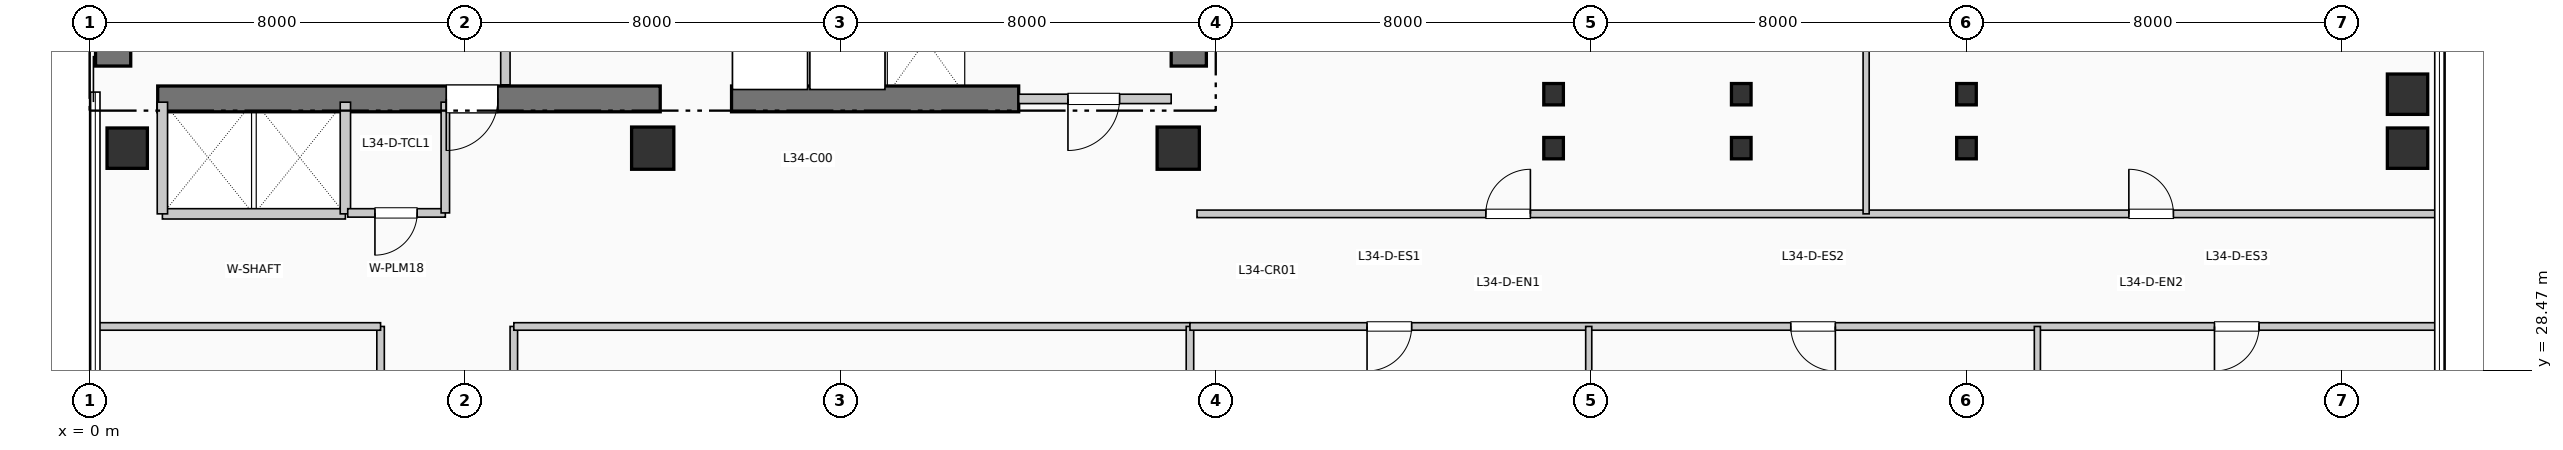
"""IFC4 building model, lengths in metres.
Left out: names, types, materials, properties, quantities, classifications, styles, units other than length and angle.
Written with IfcOpenShell. Run it as: python <this file> out.ifc"""

import sys

from ifc_helpers import new_model, si_unit, direction, frame, frame_2d, origin, origin_2d, place, context, subcontext, project, spatial, rectangle, i_section, extrude, element, fill, save


model = new_model("IFC4")
c1 = context("Model", 3, precision=1e-05, world=origin(), true_north=direction((0.0, 1.0)))
c2 = subcontext(c1, "Body", "Model", "MODEL_VIEW")
j1 = project(units=[si_unit("LENGTHUNIT", "METRE"), si_unit("PLANEANGLEUNIT", "RADIAN")], contexts=[c1])
p1 = place(None, origin())
s1 = spatial("IfcSite", under=j1, at=p1, CompositionType="ELEMENT")
p2 = place(p1, origin())
s2 = spatial("IfcBuilding", under=s1, at=p2, CompositionType="ELEMENT")
p3 = place(p2, frame((0.0, 0.0, 142.89)))
s3 = spatial("IfcBuildingStorey", under=s2, at=p3, CompositionType="ELEMENT", Elevation=142.89)
p4 = place(p3, frame((0.5, 34.95, 0.0), z_axis=(0.0, 0.0, 1.0), x_axis=(0.0, 1.0, 0.0)))
e1 = element("IfcWall", 1, at=p4, inside=s3, PredefinedType="SHEAR", context=c2, shape_type="SweptSolid", body=[
    extrude(rectangle(XDim=7.9, YDim=0.75, at=frame_2d((3.95, 0.0))), origin(), (0.0, 0.0, 1.0), 3.96),
])
p5 = place(p3, frame((23.425, 34.95, 0.0), z_axis=(0.0, 0.0, 1.0), x_axis=(0.0, 1.0, 0.0)))
e2 = element("IfcWall", 2, at=p5, inside=s3, PredefinedType="SHEAR", context=c2, shape_type="SweptSolid", body=[
    extrude(rectangle(XDim=10.64, YDim=0.75, at=frame_2d((5.32, 0.0))), origin(), (0.0, 0.0, 1.0), 3.96),
])
p6 = place(p3, frame((1.45, 34.25, 0.0), z_axis=(0.0, 0.0, 1.0), x_axis=(1.0, 0.0, 0.0)))
e3 = element("IfcWall", 3, at=p6, inside=s3, PredefinedType="SHEAR", context=c2, shape_type="SweptSolid", body=[
    extrude(rectangle(XDim=10.71, YDim=0.55, at=frame_2d((5.355, 0.0))), origin(), (0.0, 0.0, 1.0), 3.96),
])
p7 = place(p6, frame((7.25, 0.0, 0.0), z_axis=(0.0, 0.0, 1.0), x_axis=(-1.0, 0.0, 0.0)))
e4 = element("IfcOpeningElement", 4, at=p7, cuts=e3, PredefinedType="OPENING", context=c2, shape_type="SweptSolid", body=[
    extrude(rectangle(XDim=1.1, YDim=2.15, at=frame_2d((0.55, 1.075))), frame((0.0, 0.285, 0.0), z_axis=(0.0, -1.0, 0.0), x_axis=(1.0, 0.0, 0.0)), (0.0, 0.0, 1.0), 0.57),
])
p8 = place(p3, frame((13.68, 34.25, 0.0), z_axis=(0.0, 0.0, 1.0), x_axis=(1.0, 0.0, 0.0)))
e5 = element("IfcWall", 5, at=p8, inside=s3, PredefinedType="SHEAR", context=c2, shape_type="SweptSolid", body=[
    extrude(rectangle(XDim=6.12, YDim=0.55, at=frame_2d((3.06, 0.0))), origin(), (0.0, 0.0, 1.0), 3.96),
])
p9 = place(p3, frame((0.8, 33.2, 0.0), z_axis=(0.0, 0.0, 1.0), x_axis=(1.0, 0.0, 0.0)))
e6 = element("IfcColumn", 6, at=p9, inside=s3, PredefinedType="COLUMN", context=c2, shape_type="SweptSolid", body=[
    extrude(rectangle(XDim=0.86, YDim=0.86, at=origin_2d()), origin(), (0.0, 0.0, 1.0), 3.96),
])
for number, where, z_axis, x_axis in (
    (7, (12.0, 33.2, 0.0), (0.0, 0.0, 1.0), (1.0, 0.0, 0.0)),
    (8, (23.2, 33.2, 0.0), (0.0, 0.0, 1.0), (1.0, 0.0, 0.0)),
):
    element("IfcColumn", number, at=place(p3, frame(where, z_axis=z_axis, x_axis=x_axis)), inside=s3, PredefinedType="COLUMN", context=c2, shape_type="SweptSolid", body=[
        extrude(rectangle(XDim=0.9, YDim=0.9, at=origin_2d()), origin(), (0.0, 0.0, 1.0), 3.96),
    ])
for number, where, z_axis, x_axis in (
    (9, (31.2, 33.2, 0.0), (0.0, 0.0, 1.0), (1.0, 0.0, 0.0)),
    (10, (31.2, 34.35, 0.0), (0.0, 0.0, 1.0), (1.0, 0.0, 0.0)),
    (11, (35.2, 33.2, 0.0), (0.0, 0.0, 1.0), (1.0, 0.0, 0.0)),
    (12, (35.2, 34.35, 0.0), (0.0, 0.0, 1.0), (1.0, 0.0, 0.0)),
    (13, (40.0, 33.2, 0.0), (0.0, 0.0, 1.0), (1.0, 0.0, 0.0)),
    (14, (40.0, 34.35, 0.0), (0.0, 0.0, 1.0), (1.0, 0.0, 0.0)),
):
    element("IfcColumn", number, at=place(p3, frame(where, z_axis=z_axis, x_axis=x_axis)), inside=s3, PredefinedType="COLUMN", context=c2, shape_type="SweptSolid", body=[
        extrude(i_section(OverallWidth=0.418, OverallDepth=0.455, WebThickness=0.032, FlangeThickness=0.051, at=origin_2d()), origin(), (0.0, 0.0, 1.0), 3.96),
    ])
for number, where, z_axis, x_axis in (
    (15, (49.4, 33.2, 0.0), (0.0, 0.0, 1.0), (1.0, 0.0, 0.0)),
    (16, (49.4, 34.35, 0.0), (0.0, 0.0, 1.0), (1.0, 0.0, 0.0)),
):
    element("IfcColumn", number, at=place(p3, frame(where, z_axis=z_axis, x_axis=x_axis)), inside=s3, PredefinedType="COLUMN", context=c2, shape_type="SweptSolid", body=[
        extrude(rectangle(XDim=0.86, YDim=0.86, at=origin_2d()), origin(), (0.0, 0.0, 1.0), 3.96),
    ])
p10 = place(p3, frame((8.86, 34.55, 0.0), z_axis=(0.0, 0.0, 1.0), x_axis=(0.0, 1.0, 0.0)))
e17 = element("IfcWall", 17, at=p10, inside=s3, PredefinedType="PARTITIONING", context=c2, shape_type="SweptSolid", body=[
    extrude(rectangle(XDim=2.5, YDim=0.2, at=frame_2d((1.25, 0.0))), origin(), (0.0, 0.0, 1.0), 3.71),
])
p11 = place(p3, frame((19.8, 34.25, 0.0), z_axis=(0.0, 0.0, 1.0), x_axis=(1.0, 0.0, 0.0)))
e18 = element("IfcWall", 18, at=p11, inside=s3, PredefinedType="PARTITIONING", context=c2, shape_type="SweptSolid", body=[
    extrude(rectangle(XDim=3.25, YDim=0.2, at=frame_2d((1.625, 0.0))), origin(), (0.0, 0.0, 1.0), 3.71),
])
p12 = place(p11, frame((2.15, 0.0, 0.0), z_axis=(0.0, 0.0, 1.0), x_axis=(-1.0, 0.0, 0.0)))
e19 = element("IfcOpeningElement", 19, at=p12, cuts=e18, PredefinedType="OPENING", context=c2, shape_type="SweptSolid", body=[
    extrude(rectangle(XDim=1.1, YDim=2.15, at=frame_2d((0.55, 1.075))), frame((0.0, 0.11, 0.0), z_axis=(0.0, -1.0, 0.0), x_axis=(1.0, 0.0, 0.0)), (0.0, 0.0, 1.0), 0.22),
])
p13 = place(p3, frame((1.55, 31.8, 0.0), z_axis=(0.0, 0.0, 1.0), x_axis=(1.0, 0.0, 0.0)))
e20 = element("IfcWall", 20, at=p13, inside=s3, PredefinedType="PARTITIONING", context=c2, shape_type="SweptSolid", body=[
    extrude(rectangle(XDim=3.9, YDim=0.22, at=frame_2d((1.95, 0.0))), origin(), (0.0, 0.0, 1.0), 3.71),
])
for number, where, z_axis, x_axis in (
    (21, (1.55, 31.8, 0.0), (0.0, 0.0, 1.0), (0.0, 1.0, 0.0)),
    (22, (5.45, 31.8, 0.0), (0.0, 0.0, 1.0), (0.0, 1.0, 0.0)),
):
    element("IfcWall", number, at=place(p3, frame(where, z_axis=z_axis, x_axis=x_axis)), inside=s3, PredefinedType="PARTITIONING", context=c2, shape_type="SweptSolid", body=[
        extrude(rectangle(XDim=2.38, YDim=0.22, at=frame_2d((1.19, 0.0))), origin(), (0.0, 0.0, 1.0), 3.71),
    ])
p14 = place(p3, frame((5.5, 31.82, 0.0), z_axis=(0.0, 0.0, 1.0), x_axis=(1.0, 0.0, 0.0)))
e23 = element("IfcWall", 23, at=p14, inside=s3, PredefinedType="PLUMBINGWALL", context=c2, shape_type="SweptSolid", body=[
    extrude(rectangle(XDim=2.08, YDim=0.18, at=frame_2d((1.04, 0.0))), origin(), (0.0, 0.0, 1.0), 3.71),
])
p15 = place(p14, frame((1.48, 0.0, 0.0), z_axis=(0.0, 0.0, 1.0), x_axis=(-1.0, 0.0, 0.0)))
e24 = element("IfcOpeningElement", 24, at=p15, cuts=e23, PredefinedType="OPENING", context=c2, shape_type="SweptSolid", body=[
    extrude(rectangle(XDim=0.9, YDim=2.1, at=frame_2d((0.45, 1.05))), frame((0.0, 0.1, 0.0), z_axis=(0.0, -1.0, 0.0), x_axis=(1.0, 0.0, 0.0)), (0.0, 0.0, 1.0), 0.2),
])
p16 = place(p3, frame((7.58, 31.82, 0.0), z_axis=(0.0, 0.0, 1.0), x_axis=(0.0, 1.0, 0.0)))
e25 = element("IfcWall", 25, at=p16, inside=s3, PredefinedType="PLUMBINGWALL", context=c2, shape_type="SweptSolid", body=[
    extrude(rectangle(XDim=2.36, YDim=0.18, at=frame_2d((1.18, 0.0))), origin(), (0.0, 0.0, 1.0), 3.71),
])
p17 = place(p3, frame((6.2, 6.8, 0.0), z_axis=(0.0, 0.0, 1.0), x_axis=(0.0, 1.0, 0.0)))
e26 = element("IfcWall", 26, at=p17, inside=s3, PredefinedType="PARTITIONING", context=c2, shape_type="SweptSolid", body=[
    extrude(rectangle(XDim=22.6, YDim=0.16, at=frame_2d((11.3, 0.0))), origin(), (0.0, 0.0, 1.0), 3.71),
])
p18 = place(p17, frame((5.221, 0.0, 0.0), z_axis=(0.0, 0.0, 1.0), x_axis=(-1.0, 0.0, 0.0)))
e27 = element("IfcOpeningElement", 27, at=p18, cuts=e26, PredefinedType="OPENING", context=c2, shape_type="SweptSolid", body=[
    extrude(rectangle(XDim=0.95, YDim=2.15, at=frame_2d((0.475, 1.075))), frame((0.0, 0.09, 0.0), z_axis=(0.0, -1.0, 0.0), x_axis=(1.0, 0.0, 0.0)), (0.0, 0.0, 1.0), 0.18),
])
p19 = place(p17, frame((16.521, 0.0, 0.0), z_axis=(0.0, 0.0, 1.0), x_axis=(-1.0, 0.0, 0.0)))
e28 = element("IfcOpeningElement", 28, at=p19, cuts=e26, PredefinedType="OPENING", context=c2, shape_type="SweptSolid", body=[
    extrude(rectangle(XDim=0.95, YDim=2.15, at=frame_2d((0.475, 1.075))), frame((0.0, 0.09, 0.0), z_axis=(0.0, -1.0, 0.0), x_axis=(1.0, 0.0, 0.0)), (0.0, 0.0, 1.0), 0.18),
])
p20 = place(p3, frame((9.04, 6.8, 0.0), z_axis=(0.0, 0.0, 1.0), x_axis=(0.0, 1.0, 0.0)))
e29 = element("IfcWall", 29, at=p20, inside=s3, PredefinedType="PARTITIONING", context=c2, shape_type="SweptSolid", body=[
    extrude(rectangle(XDim=22.6, YDim=0.16, at=frame_2d((11.3, 0.0))), origin(), (0.0, 0.0, 1.0), 3.71),
])
p21 = place(p20, frame((2.237, 0.0, 0.0)))
e30 = element("IfcOpeningElement", 30, at=p21, cuts=e29, PredefinedType="OPENING", context=c2, shape_type="SweptSolid", body=[
    extrude(rectangle(XDim=0.95, YDim=2.15, at=frame_2d((0.475, 1.075))), frame((0.0, 0.09, 0.0), z_axis=(0.0, -1.0, 0.0), x_axis=(1.0, 0.0, 0.0)), (0.0, 0.0, 1.0), 0.18),
])
p22 = place(p20, frame((8.113, 0.0, 0.0)))
e31 = element("IfcOpeningElement", 31, at=p22, cuts=e29, PredefinedType="OPENING", context=c2, shape_type="SweptSolid", body=[
    extrude(rectangle(XDim=0.95, YDim=2.15, at=frame_2d((0.475, 1.075))), frame((0.0, 0.09, 0.0), z_axis=(0.0, -1.0, 0.0), x_axis=(1.0, 0.0, 0.0)), (0.0, 0.0, 1.0), 0.18),
])
p23 = place(p20, frame((14.215, 0.0, 0.0)))
e32 = element("IfcOpeningElement", 32, at=p23, cuts=e29, PredefinedType="OPENING", context=c2, shape_type="SweptSolid", body=[
    extrude(rectangle(XDim=0.95, YDim=2.15, at=frame_2d((0.475, 1.075))), frame((0.0, 0.09, 0.0), z_axis=(0.0, -1.0, 0.0), x_axis=(1.0, 0.0, 0.0)), (0.0, 0.0, 1.0), 0.18),
])
p24 = place(p20, frame((19.639, 0.0, 0.0)))
e33 = element("IfcOpeningElement", 33, at=p24, cuts=e29, PredefinedType="OPENING", context=c2, shape_type="SweptSolid", body=[
    extrude(rectangle(XDim=0.95, YDim=2.15, at=frame_2d((0.475, 1.075))), frame((0.0, 0.09, 0.0), z_axis=(0.0, -1.0, 0.0), x_axis=(1.0, 0.0, 0.0)), (0.0, 0.0, 1.0), 0.18),
])
p25 = place(p3, frame((0.19, 29.4, 0.0), z_axis=(0.0, 0.0, 1.0), x_axis=(1.0, 0.0, 0.0)))
e34 = element("IfcWall", 34, at=p25, inside=s3, PredefinedType="PARTITIONING", context=c2, shape_type="SweptSolid", body=[
    extrude(rectangle(XDim=6.01, YDim=0.16, at=frame_2d((3.005, 0.0))), origin(), (0.0, 0.0, 1.0), 3.365),
])
p26 = place(p3, frame((9.04, 29.4, 0.0), z_axis=(0.0, 0.0, 1.0), x_axis=(1.0, 0.0, 0.0)))
e35 = element("IfcWall", 35, at=p26, inside=s3, PredefinedType="PARTITIONING", context=c2, shape_type="SweptSolid", body=[
    extrude(rectangle(XDim=14.41, YDim=0.16, at=frame_2d((7.205, 0.0))), origin(), (0.0, 0.0, 1.0), 3.365),
])
p27 = place(p3, frame((23.45, 0.19, 0.0), z_axis=(0.0, 0.0, 1.0), x_axis=(0.0, 1.0, 0.0)))
e36 = element("IfcWall", 36, at=p27, inside=s3, PredefinedType="PARTITIONING", context=c2, shape_type="SweptSolid", body=[
    extrude(rectangle(XDim=29.21, YDim=0.16, at=frame_2d((14.605, 0.0))), origin(), (0.0, 0.0, 1.0), 3.045),
])
p28 = place(p3, frame((23.45, 29.4, 0.0), z_axis=(0.0, 0.0, 1.0), x_axis=(1.0, 0.0, 0.0)))
e37 = element("IfcWall", 37, at=p28, inside=s3, PredefinedType="PARTITIONING", context=c2, shape_type="SweptSolid", body=[
    extrude(rectangle(XDim=26.56, YDim=0.16, at=frame_2d((13.28, 0.0))), origin(), (0.0, 0.0, 1.0), 3.365),
])
p29 = place(p28, frame((4.725, 0.0, 0.0), z_axis=(0.0, 0.0, 1.0), x_axis=(-1.0, 0.0, 0.0)))
e38 = element("IfcOpeningElement", 38, at=p29, cuts=e37, PredefinedType="OPENING", context=c2, shape_type="SweptSolid", body=[
    extrude(rectangle(XDim=0.95, YDim=2.15, at=frame_2d((0.475, 1.075))), frame((0.0, 0.09, 0.0), z_axis=(0.0, -1.0, 0.0), x_axis=(1.0, 0.0, 0.0)), (0.0, 0.0, 1.0), 0.18),
])
p30 = place(p28, frame((13.755, 0.0, 0.0), z_axis=(0.0, 0.0, 1.0), x_axis=(-1.0, 0.0, 0.0)))
e39 = element("IfcOpeningElement", 39, at=p30, cuts=e37, PredefinedType="OPENING", context=c2, shape_type="SweptSolid", body=[
    extrude(rectangle(XDim=0.95, YDim=2.15, at=frame_2d((0.475, 1.075))), frame((0.0, 0.09, 0.0), z_axis=(0.0, -1.0, 0.0), x_axis=(1.0, 0.0, 0.0)), (0.0, 0.0, 1.0), 0.18),
])
p31 = place(p28, frame((22.785, 0.0, 0.0), z_axis=(0.0, 0.0, 1.0), x_axis=(-1.0, 0.0, 0.0)))
e40 = element("IfcOpeningElement", 40, at=p31, cuts=e37, PredefinedType="OPENING", context=c2, shape_type="SweptSolid", body=[
    extrude(rectangle(XDim=0.95, YDim=2.15, at=frame_2d((0.475, 1.075))), frame((0.0, 0.09, 0.0), z_axis=(0.0, -1.0, 0.0), x_axis=(1.0, 0.0, 0.0)), (0.0, 0.0, 1.0), 0.18),
])
p32 = place(p3, frame((23.6, 31.8, 0.0), z_axis=(0.0, 0.0, 1.0), x_axis=(1.0, 0.0, 0.0)))
e41 = element("IfcWall", 41, at=p32, inside=s3, PredefinedType="PARTITIONING", context=c2, shape_type="SweptSolid", body=[
    extrude(rectangle(XDim=26.41, YDim=0.16, at=frame_2d((13.205, 0.0))), origin(), (0.0, 0.0, 1.0), 3.71),
])
p33 = place(p32, frame((6.156, 0.0, 0.0)))
e42 = element("IfcOpeningElement", 42, at=p33, cuts=e41, PredefinedType="OPENING", context=c2, shape_type="SweptSolid", body=[
    extrude(rectangle(XDim=0.95, YDim=2.15, at=frame_2d((0.475, 1.075))), frame((0.0, 0.09, 0.0), z_axis=(0.0, -1.0, 0.0), x_axis=(1.0, 0.0, 0.0)), (0.0, 0.0, 1.0), 0.18),
])
p34 = place(p32, frame((19.861, 0.0, 0.0)))
e43 = element("IfcOpeningElement", 43, at=p34, cuts=e41, PredefinedType="OPENING", context=c2, shape_type="SweptSolid", body=[
    extrude(rectangle(XDim=0.95, YDim=2.15, at=frame_2d((0.475, 1.075))), frame((0.0, 0.09, 0.0), z_axis=(0.0, -1.0, 0.0), x_axis=(1.0, 0.0, 0.0)), (0.0, 0.0, 1.0), 0.18),
])
for number, where, z_axis, x_axis in (
    (44, (31.949, 22.19, 0.0), (0.0, 0.0, 1.0), (0.0, 1.0, 0.0)),
    (45, (41.511, 22.19, 0.0), (0.0, 0.0, 1.0), (0.0, 1.0, 0.0)),
):
    element("IfcWall", number, at=place(p3, frame(where, z_axis=z_axis, x_axis=x_axis)), inside=s3, PredefinedType="PARTITIONING", context=c2, shape_type="SweptSolid", body=[
        extrude(rectangle(XDim=7.21, YDim=0.13, at=frame_2d((3.605, 0.0))), origin(), (0.0, 0.0, 1.0), 3.71),
    ])
p35 = place(p3, frame((37.861, 31.8, 0.0), z_axis=(0.0, 0.0, 1.0), x_axis=(0.0, 1.0, 0.0)))
e46 = element("IfcWall", 46, at=p35, inside=s3, PredefinedType="PARTITIONING", context=c2, shape_type="SweptSolid", body=[
    extrude(rectangle(XDim=14.01, YDim=0.13, at=frame_2d((7.005, 0.0))), origin(), (0.0, 0.0, 1.0), 3.71),
])
p36 = place(p7, origin())
e47 = element("IfcDoor", 47, at=p36, inside=s3, OperationType="SINGLE_SWING_LEFT", PredefinedType="DOOR", context=c2, shape_type="SweptSolid", body=[
    extrude(rectangle(XDim=1.1, YDim=2.15, at=frame_2d((0.55, 1.075))), frame((0.0, 0.025, 0.0), z_axis=(0.0, -1.0, 0.0), x_axis=(1.0, 0.0, 0.0)), (0.0, 0.0, 1.0), 0.05),
])
fill(e4, e47)
p37 = place(p12, origin())
e48 = element("IfcDoor", 48, at=p37, inside=s3, OperationType="SINGLE_SWING_LEFT", PredefinedType="DOOR", context=c2, shape_type="SweptSolid", body=[
    extrude(rectangle(XDim=1.1, YDim=2.15, at=frame_2d((0.55, 1.075))), frame((0.0, 0.025, 0.0), z_axis=(0.0, -1.0, 0.0), x_axis=(1.0, 0.0, 0.0)), (0.0, 0.0, 1.0), 0.05),
])
fill(e19, e48)
p38 = place(p15, origin())
e49 = element("IfcDoor", 49, at=p38, inside=s3, OperationType="SINGLE_SWING_LEFT", PredefinedType="DOOR", context=c2, shape_type="SweptSolid", body=[
    extrude(rectangle(XDim=0.9, YDim=2.1, at=frame_2d((0.45, 1.05))), frame((0.0, 0.025, 0.0), z_axis=(0.0, -1.0, 0.0), x_axis=(1.0, 0.0, 0.0)), (0.0, 0.0, 1.0), 0.05),
])
fill(e24, e49)
p39 = place(p29, origin())
e50 = element("IfcDoor", 50, at=p39, inside=s3, OperationType="SINGLE_SWING_LEFT", PredefinedType="DOOR", context=c2, shape_type="SweptSolid", body=[
    extrude(rectangle(XDim=0.95, YDim=2.15, at=frame_2d((0.475, 1.075))), frame((0.0, 0.025, 0.0), z_axis=(0.0, -1.0, 0.0), x_axis=(1.0, 0.0, 0.0)), (0.0, 0.0, 1.0), 0.05),
])
fill(e38, e50)
p40 = place(p30, origin())
e51 = element("IfcDoor", 51, at=p40, inside=s3, OperationType="SINGLE_SWING_RIGHT", PredefinedType="DOOR", context=c2, shape_type="SweptSolid", body=[
    extrude(rectangle(XDim=0.95, YDim=2.15, at=frame_2d((0.475, 1.075))), frame((0.0, 0.025, 0.0), z_axis=(0.0, -1.0, 0.0), x_axis=(1.0, 0.0, 0.0)), (0.0, 0.0, 1.0), 0.05),
])
fill(e39, e51)
p41 = place(p31, origin())
e52 = element("IfcDoor", 52, at=p41, inside=s3, OperationType="SINGLE_SWING_LEFT", PredefinedType="DOOR", context=c2, shape_type="SweptSolid", body=[
    extrude(rectangle(XDim=0.95, YDim=2.15, at=frame_2d((0.475, 1.075))), frame((0.0, 0.025, 0.0), z_axis=(0.0, -1.0, 0.0), x_axis=(1.0, 0.0, 0.0)), (0.0, 0.0, 1.0), 0.05),
])
fill(e40, e52)
p42 = place(p33, origin())
e53 = element("IfcDoor", 53, at=p42, inside=s3, OperationType="SINGLE_SWING_RIGHT", PredefinedType="DOOR", context=c2, shape_type="SweptSolid", body=[
    extrude(rectangle(XDim=0.95, YDim=2.15, at=frame_2d((0.475, 1.075))), frame((0.0, 0.025, 0.0), z_axis=(0.0, -1.0, 0.0), x_axis=(1.0, 0.0, 0.0)), (0.0, 0.0, 1.0), 0.05),
])
fill(e42, e53)
p43 = place(p34, origin())
e54 = element("IfcDoor", 54, at=p43, inside=s3, OperationType="SINGLE_SWING_LEFT", PredefinedType="DOOR", context=c2, shape_type="SweptSolid", body=[
    extrude(rectangle(XDim=0.95, YDim=2.15, at=frame_2d((0.475, 1.075))), frame((0.0, 0.025, 0.0), z_axis=(0.0, -1.0, 0.0), x_axis=(1.0, 0.0, 0.0)), (0.0, 0.0, 1.0), 0.05),
])
fill(e43, e54)
save(model, sys.argv[1])
